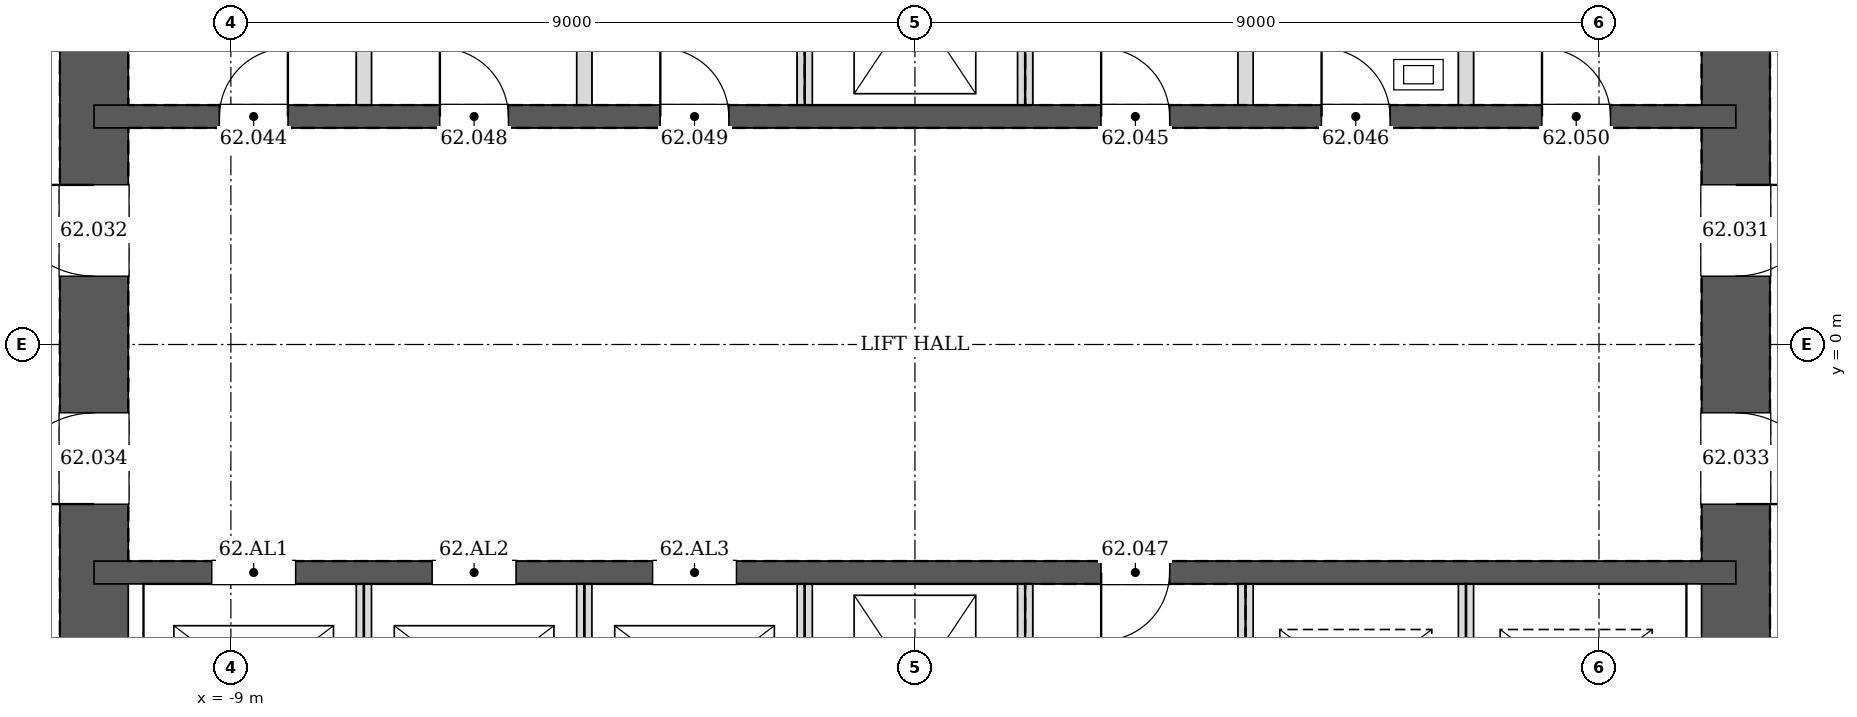
"""IFC4 building model, lengths in metres.
Left out: names, types, materials, properties, quantities, classifications, styles, units other than length and angle.
Written with IfcOpenShell. Run it as: python <this file> out.ifc"""

import sys

from ifc_helpers import new_model, si_unit, direction, frame, frame_2d, origin, place, context, subcontext, project, spatial, rectangle, extrude, element, fill, save


model = new_model("IFC4")
c1 = context("Model", 3, precision=1e-05, world=origin(), true_north=direction((0.0, 1.0)))
c2 = subcontext(c1, "Body", "Model", "MODEL_VIEW")
j1 = project(units=[si_unit("LENGTHUNIT", "METRE"), si_unit("PLANEANGLEUNIT", "RADIAN")], contexts=[c1])
p1 = place(None, origin())
s1 = spatial("IfcSite", under=j1, at=p1, CompositionType="ELEMENT")
p2 = place(p1, origin())
s2 = spatial("IfcBuilding", under=s1, at=p2, CompositionType="ELEMENT")
p3 = place(p2, frame((0.0, 0.0, 258.4)))
s3 = spatial("IfcBuildingStorey", under=s2, at=p3, CompositionType="ELEMENT", Elevation=258.4)
p4 = place(p3, frame((10.8, -10.8, 0.0), z_axis=(0.0, 0.0, 1.0), x_axis=(0.0, 1.0, 0.0)))
e1 = element("IfcWall", 1, at=p4, inside=s3, PredefinedType="SOLIDWALL", context=c2, shape_type="SweptSolid", body=[
    extrude(rectangle(XDim=21.6, YDim=0.9, at=frame_2d((10.8, 0.0))), origin(), (0.0, 0.0, 1.0), 3.4),
])
p5 = place(p4, frame((11.7, 0.0, 0.0)))
e2 = element("IfcOpeningElement", 2, at=p5, cuts=e1, PredefinedType="OPENING", context=c2, shape_type="SweptSolid", body=[
    extrude(rectangle(XDim=1.2, YDim=2.1, at=frame_2d((0.6, 1.05))), frame((0.0, 0.46, 0.0), z_axis=(0.0, -1.0, 0.0), x_axis=(1.0, 0.0, 0.0)), (0.0, 0.0, 1.0), 0.92),
])
p6 = place(p4, frame((8.7, 0.0, 0.0)))
e3 = element("IfcOpeningElement", 3, at=p6, cuts=e1, PredefinedType="OPENING", context=c2, shape_type="SweptSolid", body=[
    extrude(rectangle(XDim=1.2, YDim=2.1, at=frame_2d((0.6, 1.05))), frame((0.0, 0.46, 0.0), z_axis=(0.0, -1.0, 0.0), x_axis=(1.0, 0.0, 0.0)), (0.0, 0.0, 1.0), 0.92),
])
p7 = place(p3, frame((-10.8, 10.8, 0.0), z_axis=(0.0, 0.0, 1.0), x_axis=(0.0, -1.0, 0.0)))
e4 = element("IfcWall", 4, at=p7, inside=s3, PredefinedType="SOLIDWALL", context=c2, shape_type="SweptSolid", body=[
    extrude(rectangle(XDim=21.6, YDim=0.9, at=frame_2d((10.8, 0.0))), origin(), (0.0, 0.0, 1.0), 3.4),
])
p8 = place(p7, frame((8.7, 0.0, 0.0)))
e5 = element("IfcOpeningElement", 5, at=p8, cuts=e4, PredefinedType="OPENING", context=c2, shape_type="SweptSolid", body=[
    extrude(rectangle(XDim=1.2, YDim=2.1, at=frame_2d((0.6, 1.05))), frame((0.0, 0.46, 0.0), z_axis=(0.0, -1.0, 0.0), x_axis=(1.0, 0.0, 0.0)), (0.0, 0.0, 1.0), 0.92),
])
p9 = place(p7, frame((11.7, 0.0, 0.0)))
e6 = element("IfcOpeningElement", 6, at=p9, cuts=e4, PredefinedType="OPENING", context=c2, shape_type="SweptSolid", body=[
    extrude(rectangle(XDim=1.2, YDim=2.1, at=frame_2d((0.6, 1.05))), frame((0.0, 0.46, 0.0), z_axis=(0.0, -1.0, 0.0), x_axis=(1.0, 0.0, 0.0)), (0.0, 0.0, 1.0), 0.92),
])
p10 = place(p3, frame((-10.8, 3.0, 0.0), z_axis=(0.0, 0.0, 1.0), x_axis=(1.0, 0.0, 0.0)))
e7 = element("IfcWall", 7, at=p10, inside=s3, PredefinedType="SOLIDWALL", context=c2, shape_type="SweptSolid", body=[
    extrude(rectangle(XDim=21.6, YDim=0.3, at=frame_2d((10.8, 0.0))), origin(), (0.0, 0.0, 1.0), 3.4),
])
p11 = place(p10, frame((1.65, 0.0, 0.0)))
e8 = element("IfcOpeningElement", 8, at=p11, cuts=e7, PredefinedType="OPENING", context=c2, shape_type="SweptSolid", body=[
    extrude(rectangle(XDim=0.9, YDim=2.1, at=frame_2d((0.45, 1.05))), frame((0.0, 0.16, 0.0), z_axis=(0.0, -1.0, 0.0), x_axis=(1.0, 0.0, 0.0)), (0.0, 0.0, 1.0), 0.32),
])
p12 = place(p10, frame((13.25, 0.0, 0.0)))
e9 = element("IfcOpeningElement", 9, at=p12, cuts=e7, PredefinedType="OPENING", context=c2, shape_type="SweptSolid", body=[
    extrude(rectangle(XDim=0.9, YDim=2.1, at=frame_2d((0.45, 1.05))), frame((0.0, 0.16, 0.0), z_axis=(0.0, -1.0, 0.0), x_axis=(1.0, 0.0, 0.0)), (0.0, 0.0, 1.0), 0.32),
])
p13 = place(p10, frame((16.15, 0.0, 0.0)))
e10 = element("IfcOpeningElement", 10, at=p13, cuts=e7, PredefinedType="OPENING", context=c2, shape_type="SweptSolid", body=[
    extrude(rectangle(XDim=0.9, YDim=2.1, at=frame_2d((0.45, 1.05))), frame((0.0, 0.16, 0.0), z_axis=(0.0, -1.0, 0.0), x_axis=(1.0, 0.0, 0.0)), (0.0, 0.0, 1.0), 0.32),
])
p14 = place(p10, frame((4.55, 0.0, 0.0)))
e11 = element("IfcOpeningElement", 11, at=p14, cuts=e7, PredefinedType="OPENING", context=c2, shape_type="SweptSolid", body=[
    extrude(rectangle(XDim=0.9, YDim=2.1, at=frame_2d((0.45, 1.05))), frame((0.0, 0.16, 0.0), z_axis=(0.0, -1.0, 0.0), x_axis=(1.0, 0.0, 0.0)), (0.0, 0.0, 1.0), 0.32),
])
p15 = place(p10, frame((7.45, 0.0, 0.0)))
e12 = element("IfcOpeningElement", 12, at=p15, cuts=e7, PredefinedType="OPENING", context=c2, shape_type="SweptSolid", body=[
    extrude(rectangle(XDim=0.9, YDim=2.1, at=frame_2d((0.45, 1.05))), frame((0.0, 0.16, 0.0), z_axis=(0.0, -1.0, 0.0), x_axis=(1.0, 0.0, 0.0)), (0.0, 0.0, 1.0), 0.32),
])
p16 = place(p10, frame((19.05, 0.0, 0.0)))
e13 = element("IfcOpeningElement", 13, at=p16, cuts=e7, PredefinedType="OPENING", context=c2, shape_type="SweptSolid", body=[
    extrude(rectangle(XDim=0.9, YDim=2.1, at=frame_2d((0.45, 1.05))), frame((0.0, 0.16, 0.0), z_axis=(0.0, -1.0, 0.0), x_axis=(1.0, 0.0, 0.0)), (0.0, 0.0, 1.0), 0.32),
])
p17 = place(p3, frame((-10.8, -3.0, 0.0), z_axis=(0.0, 0.0, 1.0), x_axis=(1.0, 0.0, 0.0)))
e14 = element("IfcWall", 14, at=p17, inside=s3, PredefinedType="SOLIDWALL", context=c2, shape_type="SweptSolid", body=[
    extrude(rectangle(XDim=21.6, YDim=0.3, at=frame_2d((10.8, 0.0))), origin(), (0.0, 0.0, 1.0), 3.4),
])
p18 = place(p17, frame((13.25, 0.0, 0.0)))
e15 = element("IfcOpeningElement", 15, at=p18, cuts=e14, PredefinedType="OPENING", context=c2, shape_type="SweptSolid", body=[
    extrude(rectangle(XDim=0.9, YDim=2.1, at=frame_2d((0.45, 1.05))), frame((0.0, 0.16, 0.0), z_axis=(0.0, -1.0, 0.0), x_axis=(1.0, 0.0, 0.0)), (0.0, 0.0, 1.0), 0.32),
])
p19 = place(p17, frame((1.55, 0.0, 0.0)))
e16 = element("IfcOpeningElement", 16, at=p19, cuts=e14, PredefinedType="OPENING", context=c2, shape_type="SweptSolid", body=[
    extrude(rectangle(XDim=1.1, YDim=2.1, at=frame_2d((0.55, 1.05))), frame((0.0, 0.16, 0.0), z_axis=(0.0, -1.0, 0.0), x_axis=(1.0, 0.0, 0.0)), (0.0, 0.0, 1.0), 0.32),
])
p20 = place(p17, frame((4.45, 0.0, 0.0)))
e17 = element("IfcOpeningElement", 17, at=p20, cuts=e14, PredefinedType="OPENING", context=c2, shape_type="SweptSolid", body=[
    extrude(rectangle(XDim=1.1, YDim=2.1, at=frame_2d((0.55, 1.05))), frame((0.0, 0.16, 0.0), z_axis=(0.0, -1.0, 0.0), x_axis=(1.0, 0.0, 0.0)), (0.0, 0.0, 1.0), 0.32),
])
p21 = place(p17, frame((7.35, 0.0, 0.0)))
e18 = element("IfcOpeningElement", 18, at=p21, cuts=e14, PredefinedType="OPENING", context=c2, shape_type="SweptSolid", body=[
    extrude(rectangle(XDim=1.1, YDim=2.1, at=frame_2d((0.55, 1.05))), frame((0.0, 0.16, 0.0), z_axis=(0.0, -1.0, 0.0), x_axis=(1.0, 0.0, 0.0)), (0.0, 0.0, 1.0), 0.32),
])
for number, where, z_axis, x_axis in (
    (19, (-7.25, 3.15, 0.0), (0.0, 0.0, 1.0), (0.0, 1.0, 0.0)),
    (20, (-4.35, 3.15, 0.0), (0.0, 0.0, 1.0), (0.0, 1.0, 0.0)),
    (21, (-1.45, 3.15, 0.0), (0.0, 0.0, 1.0), (0.0, 1.0, 0.0)),
    (22, (1.45, 3.15, 0.0), (0.0, 0.0, 1.0), (0.0, 1.0, 0.0)),
    (23, (4.35, 3.15, 0.0), (0.0, 0.0, 1.0), (0.0, 1.0, 0.0)),
    (24, (7.25, 3.15, 0.0), (0.0, 0.0, 1.0), (0.0, 1.0, 0.0)),
):
    element("IfcWall", number, at=place(p3, frame(where, z_axis=z_axis, x_axis=x_axis)), inside=s3, PredefinedType="PARTITIONING", context=c2, shape_type="SweptSolid", body=[
        extrude(rectangle(XDim=2.7, YDim=0.2, at=frame_2d((1.35, 0.0))), origin(), (0.0, 0.0, 1.0), 3.15),
    ])
for number, where, z_axis, x_axis in (
    (25, (-7.25, -5.85, 0.0), (0.0, 0.0, 1.0), (0.0, 1.0, 0.0)),
    (26, (-4.35, -5.85, 0.0), (0.0, 0.0, 1.0), (0.0, 1.0, 0.0)),
    (27, (-1.45, -5.85, 0.0), (0.0, 0.0, 1.0), (0.0, 1.0, 0.0)),
):
    element("IfcWall", number, at=place(p3, frame(where, z_axis=z_axis, x_axis=x_axis)), inside=s3, PredefinedType="PARTITIONING", context=c2, shape_type="SweptSolid", body=[
        extrude(rectangle(XDim=2.7, YDim=0.2, at=frame_2d((1.35, 0.0))), origin(), (0.0, 0.0, 1.0), 3.4),
    ])
for number, where, z_axis, x_axis in (
    (28, (1.45, -5.85, 0.0), (0.0, 0.0, 1.0), (0.0, 1.0, 0.0)),
    (29, (4.35, -5.85, 0.0), (0.0, 0.0, 1.0), (0.0, 1.0, 0.0)),
):
    element("IfcWall", number, at=place(p3, frame(where, z_axis=z_axis, x_axis=x_axis)), inside=s3, PredefinedType="PARTITIONING", context=c2, shape_type="SweptSolid", body=[
        extrude(rectangle(XDim=2.7, YDim=0.2, at=frame_2d((1.35, 0.0))), origin(), (0.0, 0.0, 1.0), 3.15),
    ])
p22 = place(p3, frame((7.25, -5.85, 0.0), z_axis=(0.0, 0.0, 1.0), x_axis=(0.0, 1.0, 0.0)))
e30 = element("IfcWall", 30, at=p22, inside=s3, PredefinedType="PARTITIONING", context=c2, shape_type="SweptSolid", body=[
    extrude(rectangle(XDim=2.7, YDim=0.2, at=frame_2d((1.35, 0.0))), origin(), (0.0, 0.0, 1.0), 3.4),
])
p23 = place(p5, frame((1.2, 0.0, 0.0), z_axis=(0.0, 0.0, 1.0), x_axis=(-1.0, 0.0, 0.0)))
e31 = element("IfcDoor", 31, at=p23, inside=s3, OperationType="SINGLE_SWING_LEFT", PredefinedType="DOOR", context=c2, shape_type="SweptSolid", body=[
    extrude(rectangle(XDim=1.2, YDim=2.1, at=frame_2d((0.6, 1.05))), frame((0.0, 0.025, 0.0), z_axis=(0.0, -1.0, 0.0), x_axis=(1.0, 0.0, 0.0)), (0.0, 0.0, 1.0), 0.05),
])
fill(e2, e31)
p24 = place(p8, frame((1.2, 0.0, 0.0), z_axis=(0.0, 0.0, 1.0), x_axis=(-1.0, 0.0, 0.0)))
e32 = element("IfcDoor", 32, at=p24, inside=s3, OperationType="SINGLE_SWING_RIGHT", PredefinedType="DOOR", context=c2, shape_type="SweptSolid", body=[
    extrude(rectangle(XDim=1.2, YDim=2.1, at=frame_2d((0.6, 1.05))), frame((0.0, 0.025, 0.0), z_axis=(0.0, -1.0, 0.0), x_axis=(1.0, 0.0, 0.0)), (0.0, 0.0, 1.0), 0.05),
])
fill(e5, e32)
p25 = place(p6, frame((1.2, 0.0, 0.0), z_axis=(0.0, 0.0, 1.0), x_axis=(-1.0, 0.0, 0.0)))
e33 = element("IfcDoor", 33, at=p25, inside=s3, OperationType="SINGLE_SWING_RIGHT", PredefinedType="DOOR", context=c2, shape_type="SweptSolid", body=[
    extrude(rectangle(XDim=1.2, YDim=2.1, at=frame_2d((0.6, 1.05))), frame((0.0, 0.025, 0.0), z_axis=(0.0, -1.0, 0.0), x_axis=(1.0, 0.0, 0.0)), (0.0, 0.0, 1.0), 0.05),
])
fill(e3, e33)
p26 = place(p9, frame((1.2, 0.0, 0.0), z_axis=(0.0, 0.0, 1.0), x_axis=(-1.0, 0.0, 0.0)))
e34 = element("IfcDoor", 34, at=p26, inside=s3, OperationType="SINGLE_SWING_LEFT", PredefinedType="DOOR", context=c2, shape_type="SweptSolid", body=[
    extrude(rectangle(XDim=1.2, YDim=2.1, at=frame_2d((0.6, 1.05))), frame((0.0, 0.025, 0.0), z_axis=(0.0, -1.0, 0.0), x_axis=(1.0, 0.0, 0.0)), (0.0, 0.0, 1.0), 0.05),
])
fill(e6, e34)
p27 = place(p11, origin())
e35 = element("IfcDoor", 35, at=p27, inside=s3, OperationType="SINGLE_SWING_RIGHT", PredefinedType="DOOR", context=c2, shape_type="SweptSolid", body=[
    extrude(rectangle(XDim=0.9, YDim=2.1, at=frame_2d((0.45, 1.05))), frame((0.0, 0.025, 0.0), z_axis=(0.0, -1.0, 0.0), x_axis=(1.0, 0.0, 0.0)), (0.0, 0.0, 1.0), 0.05),
])
fill(e8, e35)
p28 = place(p12, origin())
e36 = element("IfcDoor", 36, at=p28, inside=s3, OperationType="SINGLE_SWING_LEFT", PredefinedType="DOOR", context=c2, shape_type="SweptSolid", body=[
    extrude(rectangle(XDim=0.9, YDim=2.1, at=frame_2d((0.45, 1.05))), frame((0.0, 0.025, 0.0), z_axis=(0.0, -1.0, 0.0), x_axis=(1.0, 0.0, 0.0)), (0.0, 0.0, 1.0), 0.05),
])
fill(e9, e36)
p29 = place(p13, origin())
e37 = element("IfcDoor", 37, at=p29, inside=s3, OperationType="SINGLE_SWING_LEFT", PredefinedType="DOOR", context=c2, shape_type="SweptSolid", body=[
    extrude(rectangle(XDim=0.9, YDim=2.1, at=frame_2d((0.45, 1.05))), frame((0.0, 0.025, 0.0), z_axis=(0.0, -1.0, 0.0), x_axis=(1.0, 0.0, 0.0)), (0.0, 0.0, 1.0), 0.05),
])
fill(e10, e37)
p30 = place(p18, frame((0.9, 0.0, 0.0), z_axis=(0.0, 0.0, 1.0), x_axis=(-1.0, 0.0, 0.0)))
e38 = element("IfcDoor", 38, at=p30, inside=s3, OperationType="SINGLE_SWING_RIGHT", PredefinedType="DOOR", context=c2, shape_type="SweptSolid", body=[
    extrude(rectangle(XDim=0.9, YDim=2.1, at=frame_2d((0.45, 1.05))), frame((0.0, 0.025, 0.0), z_axis=(0.0, -1.0, 0.0), x_axis=(1.0, 0.0, 0.0)), (0.0, 0.0, 1.0), 0.05),
])
fill(e15, e38)
p31 = place(p14, origin())
e39 = element("IfcDoor", 39, at=p31, inside=s3, OperationType="SINGLE_SWING_LEFT", PredefinedType="DOOR", context=c2, shape_type="SweptSolid", body=[
    extrude(rectangle(XDim=0.9, YDim=2.1, at=frame_2d((0.45, 1.05))), frame((0.0, 0.025, 0.0), z_axis=(0.0, -1.0, 0.0), x_axis=(1.0, 0.0, 0.0)), (0.0, 0.0, 1.0), 0.05),
])
fill(e11, e39)
p32 = place(p15, origin())
e40 = element("IfcDoor", 40, at=p32, inside=s3, OperationType="SINGLE_SWING_LEFT", PredefinedType="DOOR", context=c2, shape_type="SweptSolid", body=[
    extrude(rectangle(XDim=0.9, YDim=2.1, at=frame_2d((0.45, 1.05))), frame((0.0, 0.025, 0.0), z_axis=(0.0, -1.0, 0.0), x_axis=(1.0, 0.0, 0.0)), (0.0, 0.0, 1.0), 0.05),
])
fill(e12, e40)
p33 = place(p16, origin())
e41 = element("IfcDoor", 41, at=p33, inside=s3, OperationType="SINGLE_SWING_LEFT", PredefinedType="DOOR", context=c2, shape_type="SweptSolid", body=[
    extrude(rectangle(XDim=0.9, YDim=2.1, at=frame_2d((0.45, 1.05))), frame((0.0, 0.025, 0.0), z_axis=(0.0, -1.0, 0.0), x_axis=(1.0, 0.0, 0.0)), (0.0, 0.0, 1.0), 0.05),
])
fill(e13, e41)
p34 = place(p19, origin())
e42 = element("IfcDoor", 42, at=p34, inside=s3, OperationType="DOUBLE_DOOR_SLIDING", PredefinedType="DOOR", context=c2, shape_type="SweptSolid", body=[
    extrude(rectangle(XDim=1.1, YDim=2.1, at=frame_2d((0.55, 1.05))), frame((0.0, 0.025, 0.0), z_axis=(0.0, -1.0, 0.0), x_axis=(1.0, 0.0, 0.0)), (0.0, 0.0, 1.0), 0.05),
])
fill(e16, e42)
p35 = place(p20, origin())
e43 = element("IfcDoor", 43, at=p35, inside=s3, OperationType="DOUBLE_DOOR_SLIDING", PredefinedType="DOOR", context=c2, shape_type="SweptSolid", body=[
    extrude(rectangle(XDim=1.1, YDim=2.1, at=frame_2d((0.55, 1.05))), frame((0.0, 0.025, 0.0), z_axis=(0.0, -1.0, 0.0), x_axis=(1.0, 0.0, 0.0)), (0.0, 0.0, 1.0), 0.05),
])
fill(e17, e43)
p36 = place(p21, origin())
e44 = element("IfcDoor", 44, at=p36, inside=s3, OperationType="DOUBLE_DOOR_SLIDING", PredefinedType="DOOR", context=c2, shape_type="SweptSolid", body=[
    extrude(rectangle(XDim=1.1, YDim=2.1, at=frame_2d((0.55, 1.05))), frame((0.0, 0.025, 0.0), z_axis=(0.0, -1.0, 0.0), x_axis=(1.0, 0.0, 0.0)), (0.0, 0.0, 1.0), 0.05),
])
fill(e18, e44)
save(model, sys.argv[1])
